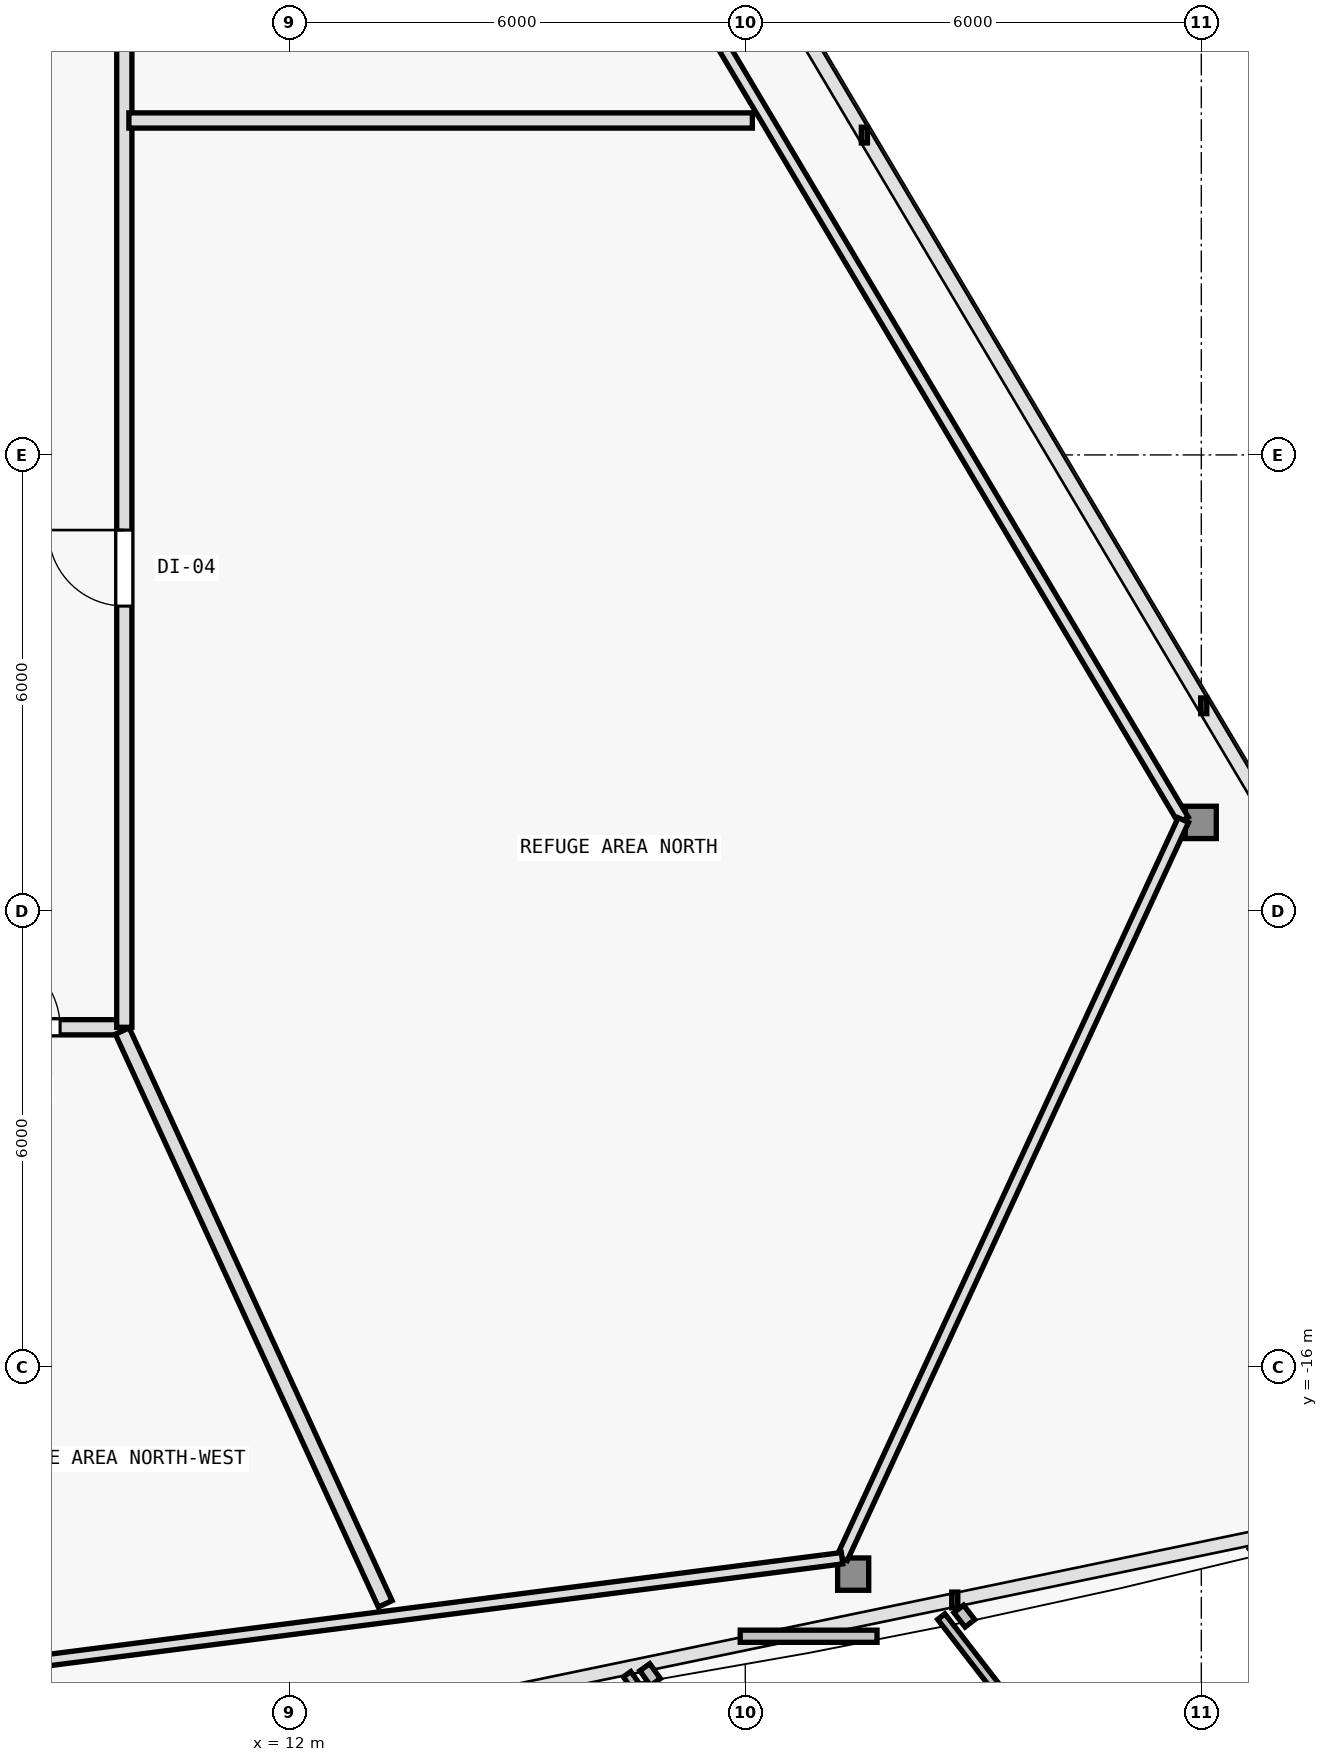
"""IFC4 building model, lengths in metres.
Left out: names, types, materials, properties, quantities, classifications, styles, units other than length and angle.
Written with IfcOpenShell. Run it as: python <this file> out.ifc"""

import sys

from ifc_helpers import new_model, si_unit, direction, frame, frame_2d, origin, origin_2d, place, context, subcontext, project, spatial, rectangle, i_section, extrude, element, fill, save


model = new_model("IFC4")
c1 = context("Model", 3, precision=1e-05, world=origin(), true_north=direction((0.0, 1.0)))
c2 = subcontext(c1, "Body", "Model", "MODEL_VIEW")
j1 = project(units=[si_unit("LENGTHUNIT", "METRE"), si_unit("PLANEANGLEUNIT", "RADIAN")], contexts=[c1])
p1 = place(None, origin())
s1 = spatial("IfcSite", under=j1, at=p1, CompositionType="ELEMENT")
p2 = place(p1, origin())
s2 = spatial("IfcBuilding", under=s1, at=p2, CompositionType="ELEMENT")
p3 = place(p2, frame((0.0, 0.0, 73.2)))
s3 = spatial("IfcBuildingStorey", under=s2, at=p3, CompositionType="ELEMENT", Elevation=73.2)
p4 = place(p3, frame((19.42, -18.724, 0.006), z_axis=(-0.01589889458, 0.025784745697, 0.999541080717), x_axis=(-0.851195920716, -0.524848077596, 0.0)))
e1 = element("IfcColumn", 1, at=p4, inside=s3, PredefinedType="COLUMN", context=c2, shape_type="SweptSolid", body=[
    extrude(i_section(OverallWidth=0.409, OverallDepth=0.425, WebThickness=0.021, FlangeThickness=0.034, FilletRadius=0.015, at=origin_2d()), origin(), (0.0, 0.0, 1.0), 4.791),
])
p5 = place(p3, frame((23.993, -8.834, 0.006), z_axis=(-0.020130771802, 0.016665221213, 0.999658452887), x_axis=(-0.637687438134, -0.770295223434, 0.0)))
e2 = element("IfcColumn", 2, at=p5, inside=s3, PredefinedType="COLUMN", context=c2, shape_type="SweptSolid", body=[
    extrude(i_section(OverallWidth=0.409, OverallDepth=0.425, WebThickness=0.021, FlangeThickness=0.034, FilletRadius=0.015, at=origin_2d()), origin(), (0.0, 0.0, 1.0), 4.791),
])
p6 = place(p3, frame((16.992, 2.584, 0.0), z_axis=(0.0, 0.0, 1.0), x_axis=(0.511096364948, -0.859523417794, 0.0)))
e3 = element("IfcWall", 3, at=p6, inside=s3, PredefinedType="PARTITIONING", context=c2, shape_type="SweptSolid", body=[
    extrude(rectangle(XDim=13.25, YDim=0.15, at=frame_2d((6.625, 0.0))), origin(), (0.0, 0.0, 1.0), 3.759),
])
p7 = place(p3, frame((23.764, -8.804, 0.0), z_axis=(0.0, 0.0, 1.0), x_axis=(-0.419704898633, -0.907660618328, 0.0)))
e4 = element("IfcWall", 4, at=p7, inside=s3, PredefinedType="PARTITIONING", context=c2, shape_type="SweptSolid", body=[
    extrude(rectangle(XDim=10.699, YDim=0.15, at=frame_2d((5.35, 0.0))), origin(), (0.0, 0.0, 1.0), 3.759),
])
p8 = place(p3, frame((19.273, -18.515, 0.0), z_axis=(0.0, 0.0, 1.0), x_axis=(-0.991858375922, -0.127345836654, 0.0)))
e5 = element("IfcWall", 5, at=p8, inside=s3, PredefinedType="PARTITIONING", context=c2, shape_type="SweptSolid", body=[
    extrude(rectangle(XDim=12.893, YDim=0.15, at=frame_2d((6.446, 0.0))), origin(), (0.0, 0.0, 1.0), 3.875),
])
p9 = place(p3, frame((-9.83, -11.53, 0.0), z_axis=(0.0, 0.0, 1.0), x_axis=(1.0, 0.0, 0.0)))
e6 = element("IfcWall", 6, at=p9, inside=s3, PredefinedType="SOLIDWALL", context=c2, shape_type="SweptSolid", body=[
    extrude(rectangle(XDim=19.66, YDim=0.2, at=frame_2d((9.83, 0.0))), origin(), (0.0, 0.0, 1.0), 3.875),
])
p10 = place(p9, frame((0.845, 0.0, 0.0)))
e7 = element("IfcOpeningElement", 7, at=p10, cuts=e6, PredefinedType="OPENING", context=c2, shape_type="SweptSolid", body=[
    extrude(rectangle(XDim=1.0, YDim=2.15, at=frame_2d((0.5, 1.075))), frame((0.0, 0.11, 0.0), z_axis=(0.0, -1.0, 0.0), x_axis=(1.0, 0.0, 0.0)), (0.0, 0.0, 1.0), 0.22),
])
p11 = place(p9, frame((9.33, 0.0, 0.0)))
e8 = element("IfcOpeningElement", 8, at=p11, cuts=e6, PredefinedType="OPENING", context=c2, shape_type="SweptSolid", body=[
    extrude(rectangle(XDim=1.0, YDim=2.15, at=frame_2d((0.5, 1.075))), frame((0.0, 0.11, 0.0), z_axis=(0.0, -1.0, 0.0), x_axis=(1.0, 0.0, 0.0)), (0.0, 0.0, 1.0), 0.22),
])
p12 = place(p9, frame((17.815, 0.0, 0.0)))
e9 = element("IfcOpeningElement", 9, at=p12, cuts=e6, PredefinedType="OPENING", context=c2, shape_type="SweptSolid", body=[
    extrude(rectangle(XDim=1.0, YDim=2.15, at=frame_2d((0.5, 1.075))), frame((0.0, 0.11, 0.0), z_axis=(0.0, -1.0, 0.0), x_axis=(1.0, 0.0, 0.0)), (0.0, 0.0, 1.0), 0.22),
])
p13 = place(p3, frame((9.83, -11.53, 0.0), z_axis=(0.0, 0.0, 1.0), x_axis=(0.0, 1.0, 0.0)))
e10 = element("IfcWall", 10, at=p13, inside=s3, PredefinedType="SOLIDWALL", context=c2, shape_type="SweptSolid", body=[
    extrude(rectangle(XDim=17.81, YDim=0.2, at=frame_2d((8.905, 0.0))), origin(), (0.0, 0.0, 1.0), 3.759),
])
p14 = place(p13, frame((5.542, 0.0, 0.0)))
e11 = element("IfcOpeningElement", 11, at=p14, cuts=e10, PredefinedType="OPENING", context=c2, shape_type="SweptSolid", body=[
    extrude(rectangle(XDim=1.0, YDim=2.15, at=frame_2d((0.5, 1.075))), frame((0.0, 0.11, 0.0), z_axis=(0.0, -1.0, 0.0), x_axis=(1.0, 0.0, 0.0)), (0.0, 0.0, 1.0), 0.22),
])
p15 = place(p13, frame((14.293, 0.0, 0.0)))
e12 = element("IfcOpeningElement", 12, at=p15, cuts=e10, PredefinedType="OPENING", context=c2, shape_type="SweptSolid", body=[
    extrude(rectangle(XDim=1.0, YDim=2.15, at=frame_2d((0.5, 1.075))), frame((0.0, 0.11, 0.0), z_axis=(0.0, -1.0, 0.0), x_axis=(1.0, 0.0, 0.0)), (0.0, 0.0, 1.0), 0.22),
])
p16 = place(p3, frame((9.803, -11.579, 0.0), z_axis=(0.0, 0.0, 1.0), x_axis=(0.417145334668, -0.908839793234, 0.0)))
e13 = element("IfcWall", 13, at=p16, inside=s3, PredefinedType="SOLIDWALL", context=c2, shape_type="SweptSolid", body=[
    extrude(rectangle(XDim=8.292, YDim=0.2, at=frame_2d((4.146, 0.0))), origin(), (0.0, 0.0, 1.0), 3.985),
])
p17 = place(p3, frame((9.89, 0.4, 0.0), z_axis=(0.0, 0.0, 1.0), x_axis=(1.0, 0.0, 0.0)))
e14 = element("IfcWall", 14, at=p17, inside=s3, PredefinedType="SOLIDWALL", context=c2, shape_type="SweptSolid", body=[
    extrude(rectangle(XDim=8.204, YDim=0.2, at=frame_2d((4.102, 0.0))), origin(), (0.0, 0.0, 1.0), 3.875),
])
p18 = place(p12, origin())
e15 = element("IfcDoor", 15, at=p18, inside=s3, OperationType="SINGLE_SWING_LEFT", PredefinedType="DOOR", context=c2, shape_type="SweptSolid", body=[
    extrude(rectangle(XDim=1.0, YDim=2.15, at=frame_2d((0.5, 1.075))), frame((0.0, 0.025, 0.0), z_axis=(0.0, -1.0, 0.0), x_axis=(1.0, 0.0, 0.0)), (0.0, 0.0, 1.0), 0.05),
])
fill(e9, e15)
p19 = place(p14, origin())
e16 = element("IfcDoor", 16, at=p19, inside=s3, OperationType="SINGLE_SWING_RIGHT", PredefinedType="DOOR", context=c2, shape_type="SweptSolid", body=[
    extrude(rectangle(XDim=1.0, YDim=2.15, at=frame_2d((0.5, 1.075))), frame((0.0, 0.025, 0.0), z_axis=(0.0, -1.0, 0.0), x_axis=(1.0, 0.0, 0.0)), (0.0, 0.0, 1.0), 0.05),
])
fill(e11, e16)
save(model, sys.argv[1])
